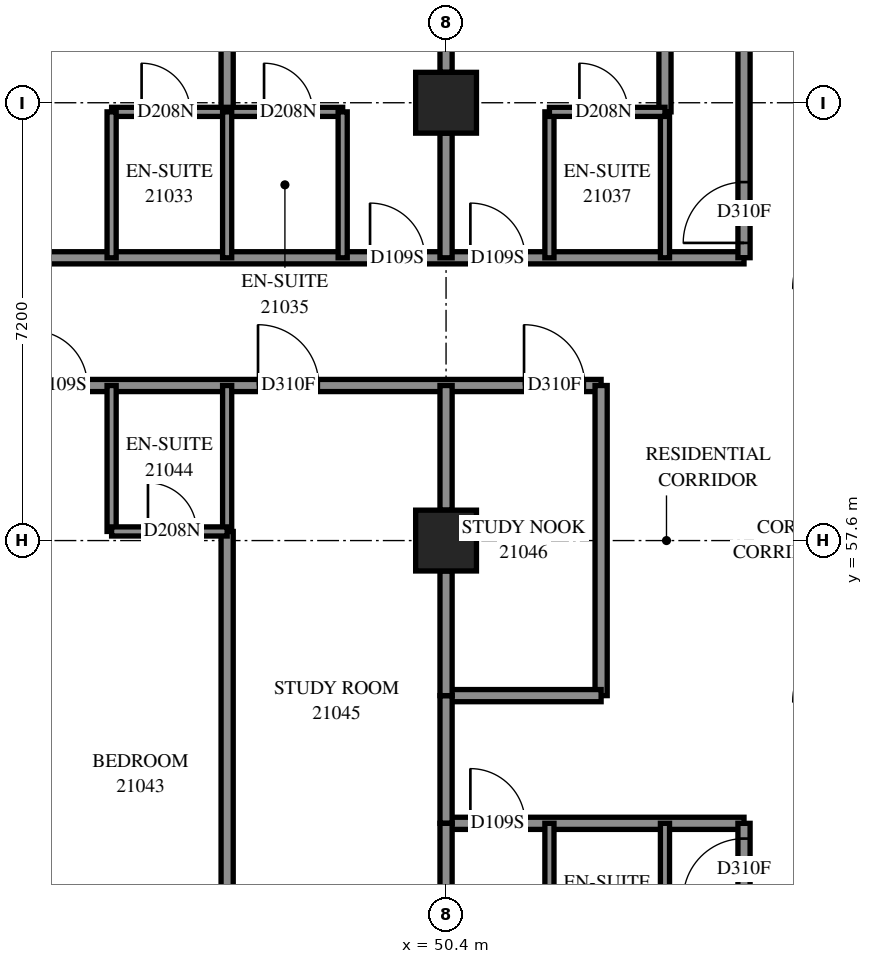
"""IFC4 building model, lengths in metres.
Left out: names, types, materials, properties, quantities, classifications, styles, units other than length and angle.
Written with IfcOpenShell. Run it as: python <this file> out.ifc"""

import sys

from ifc_helpers import new_model, si_unit, direction, frame, frame_2d, origin, origin_2d, place, context, subcontext, project, spatial, rectangle, extrude, element, fill, save


model = new_model("IFC4")
c1 = context("Model", 3, precision=1e-05, world=origin(), true_north=direction((0.0, 1.0)))
c2 = subcontext(c1, "Body", "Model", "MODEL_VIEW")
j1 = project(units=[si_unit("LENGTHUNIT", "METRE"), si_unit("PLANEANGLEUNIT", "RADIAN")], contexts=[c1])
p1 = place(None, origin())
s1 = spatial("IfcSite", under=j1, at=p1, CompositionType="ELEMENT")
p2 = place(p1, origin())
s2 = spatial("IfcBuilding", under=s1, at=p2, CompositionType="ELEMENT")
p3 = place(p2, frame((0.0, 0.0, 81.2)))
s3 = spatial("IfcBuildingStorey", under=s2, at=p3, CompositionType="ELEMENT", Elevation=81.2)
for number, where, z_axis, x_axis in (
    (1, (50.4, 57.6, 0.0), (0.0, 0.0, 1.0), (1.0, 0.0, 0.0)),
    (2, (50.4, 64.8, 0.0), (0.0, 0.0, 1.0), (1.0, 0.0, 0.0)),
):
    element("IfcColumn", number, at=place(p3, frame(where, z_axis=z_axis, x_axis=x_axis)), inside=s3, PredefinedType="COLUMN", context=c2, shape_type="SweptSolid", body=[
        extrude(rectangle(XDim=1.0, YDim=1.0, at=origin_2d()), origin(), (0.0, 0.0, 1.0), 3.1),
    ])
p4 = place(p3, frame((28.8, 60.15, 0.0), z_axis=(0.0, 0.0, 1.0), x_axis=(1.0, 0.0, 0.0)))
e3 = element("IfcWall", 3, at=p4, inside=s3, PredefinedType="PARTITIONING", context=c2, shape_type="SweptSolid", body=[
    extrude(rectangle(XDim=24.15, YDim=0.2, at=frame_2d((12.075, 0.0))), origin(), (0.0, 0.0, 1.0), 3.1),
])
p5 = place(p4, frame((11.325, 0.0, 0.0)))
e4 = element("IfcOpeningElement", 4, at=p5, cuts=e3, PredefinedType="OPENING", context=c2, shape_type="SweptSolid", body=[
    extrude(rectangle(XDim=1.0, YDim=2.1, at=frame_2d((0.5, 1.05))), frame((0.0, 0.11, 0.0), z_axis=(0.0, -1.0, 0.0), x_axis=(1.0, 0.0, 0.0)), (0.0, 0.0, 1.0), 0.22),
])
p6 = place(p4, frame((14.8, 0.0, 0.0)))
e5 = element("IfcOpeningElement", 5, at=p6, cuts=e3, PredefinedType="OPENING", context=c2, shape_type="SweptSolid", body=[
    extrude(rectangle(XDim=0.9, YDim=2.1, at=frame_2d((0.45, 1.05))), frame((0.0, 0.11, 0.0), z_axis=(0.0, -1.0, 0.0), x_axis=(1.0, 0.0, 0.0)), (0.0, 0.0, 1.0), 0.22),
])
p7 = place(p4, frame((18.508, 0.0, 0.0)))
e6 = element("IfcOpeningElement", 6, at=p7, cuts=e3, PredefinedType="OPENING", context=c2, shape_type="SweptSolid", body=[
    extrude(rectangle(XDim=1.0, YDim=2.1, at=frame_2d((0.5, 1.05))), frame((0.0, 0.11, 0.0), z_axis=(0.0, -1.0, 0.0), x_axis=(1.0, 0.0, 0.0)), (0.0, 0.0, 1.0), 0.22),
])
p8 = place(p4, frame((22.882, 0.0, 0.0)))
e7 = element("IfcOpeningElement", 7, at=p8, cuts=e3, PredefinedType="OPENING", context=c2, shape_type="SweptSolid", body=[
    extrude(rectangle(XDim=1.0, YDim=2.1, at=frame_2d((0.5, 1.05))), frame((0.0, 0.11, 0.0), z_axis=(0.0, -1.0, 0.0), x_axis=(1.0, 0.0, 0.0)), (0.0, 0.0, 1.0), 0.22),
])
p9 = place(p3, frame((33.45, 62.25, 0.0), z_axis=(0.0, 0.0, 1.0), x_axis=(1.0, 0.0, 0.0)))
e8 = element("IfcWall", 8, at=p9, inside=s3, PredefinedType="PARTITIONING", context=c2, shape_type="SweptSolid", body=[
    extrude(rectangle(XDim=21.85, YDim=0.2, at=frame_2d((10.925, 0.0))), origin(), (0.0, 0.0, 1.0), 3.1),
])
p10 = place(p9, frame((0.144, 0.0, 0.0)))
e9 = element("IfcOpeningElement", 9, at=p10, cuts=e8, PredefinedType="OPENING", context=c2, shape_type="SweptSolid", body=[
    extrude(rectangle(XDim=1.0, YDim=2.1, at=frame_2d((0.5, 1.05))), frame((0.0, 0.11, 0.0), z_axis=(0.0, -1.0, 0.0), x_axis=(1.0, 0.0, 0.0)), (0.0, 0.0, 1.0), 0.22),
])
p11 = place(p9, frame((2.95, 0.0, 0.0)))
e10 = element("IfcOpeningElement", 10, at=p11, cuts=e8, PredefinedType="OPENING", context=c2, shape_type="SweptSolid", body=[
    extrude(rectangle(XDim=0.9, YDim=2.1, at=frame_2d((0.45, 1.05))), frame((0.0, 0.11, 0.0), z_axis=(0.0, -1.0, 0.0), x_axis=(1.0, 0.0, 0.0)), (0.0, 0.0, 1.0), 0.22),
])
p12 = place(p9, frame((8.407, 0.0, 0.0)))
e11 = element("IfcOpeningElement", 11, at=p12, cuts=e8, PredefinedType="OPENING", context=c2, shape_type="SweptSolid", body=[
    extrude(rectangle(XDim=0.9, YDim=2.1, at=frame_2d((0.45, 1.05))), frame((0.0, 0.11, 0.0), z_axis=(0.0, -1.0, 0.0), x_axis=(1.0, 0.0, 0.0)), (0.0, 0.0, 1.0), 0.22),
])
p13 = place(p9, frame((15.7, 0.0, 0.0)))
e12 = element("IfcOpeningElement", 12, at=p13, cuts=e8, PredefinedType="OPENING", context=c2, shape_type="SweptSolid", body=[
    extrude(rectangle(XDim=0.9, YDim=2.1, at=frame_2d((0.45, 1.05))), frame((0.0, 0.11, 0.0), z_axis=(0.0, -1.0, 0.0), x_axis=(1.0, 0.0, 0.0)), (0.0, 0.0, 1.0), 0.22),
])
p14 = place(p9, frame((17.35, 0.0, 0.0)))
e13 = element("IfcOpeningElement", 13, at=p14, cuts=e8, PredefinedType="OPENING", context=c2, shape_type="SweptSolid", body=[
    extrude(rectangle(XDim=0.9, YDim=2.1, at=frame_2d((0.45, 1.05))), frame((0.0, 0.11, 0.0), z_axis=(0.0, -1.0, 0.0), x_axis=(1.0, 0.0, 0.0)), (0.0, 0.0, 1.0), 0.22),
])
p15 = place(p3, frame((46.8, 64.65, 0.0), z_axis=(0.0, 0.0, 1.0), x_axis=(0.0, 1.0, 0.0)))
e14 = element("IfcWall", 14, at=p15, inside=s3, PredefinedType="PARTITIONING", context=c2, shape_type="SweptSolid", body=[
    extrude(rectangle(XDim=8.062, YDim=0.2, at=frame_2d((4.031, 0.0))), origin(), (0.0, 0.0, 1.0), 3.1),
])
p16 = place(p3, frame((54.0, 64.65, 0.0), z_axis=(0.0, 0.0, 1.0), x_axis=(0.0, 1.0, 0.0)))
e15 = element("IfcWall", 15, at=p16, inside=s3, PredefinedType="PARTITIONING", context=c2, shape_type="SweptSolid", body=[
    extrude(rectangle(XDim=8.032, YDim=0.2, at=frame_2d((4.016, 0.0))), origin(), (0.0, 0.0, 1.0), 3.1),
])
p17 = place(p3, frame((46.8, 49.75, 0.0), z_axis=(0.0, 0.0, 1.0), x_axis=(0.0, 1.0, 0.0)))
e16 = element("IfcWall", 16, at=p17, inside=s3, PredefinedType="PARTITIONING", context=c2, shape_type="SweptSolid", body=[
    extrude(rectangle(XDim=8.0, YDim=0.2, at=frame_2d((4.0, 0.0))), origin(), (0.0, 0.0, 1.0), 3.1),
])
p18 = place(p3, frame((50.4, 65.3, 0.0), z_axis=(0.0, 0.0, 1.0), x_axis=(0.0, 1.0, 0.0)))
e17 = element("IfcWall", 17, at=p18, inside=s3, PredefinedType="PARTITIONING", context=c2, shape_type="SweptSolid", body=[
    extrude(rectangle(XDim=6.2, YDim=0.2, at=frame_2d((3.1, 0.0))), origin(), (0.0, 0.0, 1.0), 3.1),
])
p19 = place(p3, frame((52.95, 55.05, 0.0), z_axis=(0.0, 0.0, 1.0), x_axis=(0.0, 1.0, 0.0)))
e18 = element("IfcWall", 18, at=p19, inside=s3, PredefinedType="PARTITIONING", context=c2, shape_type="SweptSolid", body=[
    extrude(rectangle(XDim=5.1, YDim=0.2, at=frame_2d((2.55, 0.0))), origin(), (0.0, 0.0, 1.0), 3.1),
])
p20 = place(p3, frame((50.4, 52.95, 0.0), z_axis=(0.0, 0.0, 1.0), x_axis=(1.0, 0.0, 0.0)))
e19 = element("IfcWall", 19, at=p20, inside=s3, PredefinedType="PARTITIONING", context=c2, shape_type="SweptSolid", body=[
    extrude(rectangle(XDim=4.9, YDim=0.2, at=frame_2d((2.45, 0.0))), origin(), (0.0, 0.0, 1.0), 3.1),
])
p21 = place(p20, frame((0.4, 0.0, 0.0)))
e20 = element("IfcOpeningElement", 20, at=p21, cuts=e19, PredefinedType="OPENING", context=c2, shape_type="SweptSolid", body=[
    extrude(rectangle(XDim=0.9, YDim=2.1, at=frame_2d((0.45, 1.05))), frame((0.0, 0.11, 0.0), z_axis=(0.0, -1.0, 0.0), x_axis=(1.0, 0.0, 0.0)), (0.0, 0.0, 1.0), 0.22),
])
p22 = place(p3, frame((55.3, 48.1, 0.0), z_axis=(0.0, 0.0, 1.0), x_axis=(0.0, 1.0, 0.0)))
e21 = element("IfcWall", 21, at=p22, inside=s3, PredefinedType="PARTITIONING", context=c2, shape_type="SweptSolid", body=[
    extrude(rectangle(XDim=4.85, YDim=0.2, at=frame_2d((2.425, 0.0))), origin(), (0.0, 0.0, 1.0), 3.1),
])
p23 = place(p22, frame((3.599, 0.0, 0.0)))
e22 = element("IfcOpeningElement", 22, at=p23, cuts=e21, PredefinedType="OPENING", context=c2, shape_type="SweptSolid", body=[
    extrude(rectangle(XDim=1.0, YDim=2.1, at=frame_2d((0.5, 1.05))), frame((0.0, 0.11, 0.0), z_axis=(0.0, -1.0, 0.0), x_axis=(1.0, 0.0, 0.0)), (0.0, 0.0, 1.0), 0.22),
])
p24 = place(p3, frame((55.3, 62.252, 0.0), z_axis=(0.0, 0.0, 1.0), x_axis=(0.0, 1.0, 0.0)))
e23 = element("IfcWall", 23, at=p24, inside=s3, PredefinedType="PARTITIONING", context=c2, shape_type="SweptSolid", body=[
    extrude(rectangle(XDim=4.848, YDim=0.2, at=frame_2d((2.424, 0.0))), origin(), (0.0, 0.0, 1.0), 3.1),
])
p25 = place(p24, frame((0.243, 0.0, 0.0)))
e24 = element("IfcOpeningElement", 24, at=p25, cuts=e23, PredefinedType="OPENING", context=c2, shape_type="SweptSolid", body=[
    extrude(rectangle(XDim=1.0, YDim=2.1, at=frame_2d((0.5, 1.05))), frame((0.0, 0.11, 0.0), z_axis=(0.0, -1.0, 0.0), x_axis=(1.0, 0.0, 0.0)), (0.0, 0.0, 1.0), 0.22),
])
p26 = place(p3, frame((44.9, 64.65, 0.0), z_axis=(0.0, 0.0, 1.0), x_axis=(1.0, 0.0, 0.0)))
e25 = element("IfcWall", 25, at=p26, inside=s3, PredefinedType="PARTITIONING", context=c2, shape_type="SweptSolid", body=[
    extrude(rectangle(XDim=3.8, YDim=0.15, at=frame_2d((1.9, 0.0))), origin(), (0.0, 0.0, 1.0), 3.1),
])
p27 = place(p26, frame((0.493, 0.0, 0.0)))
e26 = element("IfcOpeningElement", 26, at=p27, cuts=e25, PredefinedType="OPENING", context=c2, shape_type="SweptSolid", body=[
    extrude(rectangle(XDim=0.8, YDim=2.1, at=frame_2d((0.4, 1.05))), frame((0.0, 0.085, 0.0), z_axis=(0.0, -1.0, 0.0), x_axis=(1.0, 0.0, 0.0)), (0.0, 0.0, 1.0), 0.17),
])
p28 = place(p26, frame((2.507, 0.0, 0.0)))
e27 = element("IfcOpeningElement", 27, at=p28, cuts=e25, PredefinedType="OPENING", context=c2, shape_type="SweptSolid", body=[
    extrude(rectangle(XDim=0.8, YDim=2.1, at=frame_2d((0.4, 1.05))), frame((0.0, 0.085, 0.0), z_axis=(0.0, -1.0, 0.0), x_axis=(1.0, 0.0, 0.0)), (0.0, 0.0, 1.0), 0.17),
])
p29 = place(p3, frame((50.4, 55.05, 0.0), z_axis=(0.0, 0.0, 1.0), x_axis=(1.0, 0.0, 0.0)))
e28 = element("IfcWall", 28, at=p29, inside=s3, PredefinedType="PARTITIONING", context=c2, shape_type="SweptSolid", body=[
    extrude(rectangle(XDim=2.55, YDim=0.2, at=frame_2d((1.275, 0.0))), origin(), (0.0, 0.0, 1.0), 3.1),
])
for number, where, z_axis, x_axis in (
    (29, (44.9, 62.25, 0.0), (0.0, 0.0, 1.0), (0.0, 1.0, 0.0)),
    (30, (46.8, 62.25, 0.0), (0.0, 0.0, 1.0), (0.0, 1.0, 0.0)),
    (31, (48.7, 62.25, 0.0), (0.0, 0.0, 1.0), (0.0, 1.0, 0.0)),
    (32, (52.1, 50.55, 0.0), (0.0, 0.0, 1.0), (0.0, 1.0, 0.0)),
    (33, (52.1, 62.25, 0.0), (0.0, 0.0, 1.0), (0.0, 1.0, 0.0)),
    (34, (54.0, 50.55, 0.0), (0.0, 0.0, 1.0), (0.0, 1.0, 0.0)),
    (35, (54.0, 62.25, 0.0), (0.0, 0.0, 1.0), (0.0, 1.0, 0.0)),
    (36, (44.9, 57.75, 0.0), (0.0, 0.0, 1.0), (0.0, 1.0, 0.0)),
    (37, (46.8, 57.75, 0.0), (0.0, 0.0, 1.0), (0.0, 1.0, 0.0)),
):
    element("IfcWall", number, at=place(p3, frame(where, z_axis=z_axis, x_axis=x_axis)), inside=s3, PredefinedType="PARTITIONING", context=c2, shape_type="SweptSolid", body=[
        extrude(rectangle(XDim=2.4, YDim=0.15, at=frame_2d((1.2, 0.0))), origin(), (0.0, 0.0, 1.0), 3.1),
    ])
p30 = place(p3, frame((50.4, 52.95, 0.0), z_axis=(0.0, 0.0, 1.0), x_axis=(0.0, 1.0, 0.0)))
e38 = element("IfcWall", 38, at=p30, inside=s3, PredefinedType="PARTITIONING", context=c2, shape_type="SweptSolid", body=[
    extrude(rectangle(XDim=2.1, YDim=0.2, at=frame_2d((1.05, 0.0))), origin(), (0.0, 0.0, 1.0), 3.1),
])
for number, where, z_axis, x_axis in (
    (39, (50.4, 50.9, 0.0), (0.0, 0.0, 1.0), (0.0, 1.0, 0.0)),
    (40, (50.4, 55.05, 0.0), (0.0, 0.0, 1.0), (0.0, 1.0, 0.0)),
    (41, (50.4, 58.1, 0.0), (0.0, 0.0, 1.0), (0.0, 1.0, 0.0)),
    (42, (50.4, 62.25, 0.0), (0.0, 0.0, 1.0), (0.0, 1.0, 0.0)),
):
    element("IfcWall", number, at=place(p3, frame(where, z_axis=z_axis, x_axis=x_axis)), inside=s3, PredefinedType="PARTITIONING", context=c2, shape_type="SweptSolid", body=[
        extrude(rectangle(XDim=2.05, YDim=0.2, at=frame_2d((1.025, 0.0))), origin(), (0.0, 0.0, 1.0), 3.1),
    ])
p31 = place(p3, frame((52.1, 64.65, 0.0), z_axis=(0.0, 0.0, 1.0), x_axis=(1.0, 0.0, 0.0)))
e43 = element("IfcWall", 43, at=p31, inside=s3, PredefinedType="PARTITIONING", context=c2, shape_type="SweptSolid", body=[
    extrude(rectangle(XDim=1.9, YDim=0.15, at=frame_2d((0.95, 0.0))), origin(), (0.0, 0.0, 1.0), 3.1),
])
p32 = place(p31, frame((0.493, 0.0, 0.0)))
e44 = element("IfcOpeningElement", 44, at=p32, cuts=e43, PredefinedType="OPENING", context=c2, shape_type="SweptSolid", body=[
    extrude(rectangle(XDim=0.8, YDim=2.1, at=frame_2d((0.4, 1.05))), frame((0.0, 0.085, 0.0), z_axis=(0.0, -1.0, 0.0), x_axis=(1.0, 0.0, 0.0)), (0.0, 0.0, 1.0), 0.17),
])
p33 = place(p3, frame((44.9, 57.75, 0.0), z_axis=(0.0, 0.0, 1.0), x_axis=(1.0, 0.0, 0.0)))
e45 = element("IfcWall", 45, at=p33, inside=s3, PredefinedType="PARTITIONING", context=c2, shape_type="SweptSolid", body=[
    extrude(rectangle(XDim=1.9, YDim=0.15, at=frame_2d((0.95, 0.0))), origin(), (0.0, 0.0, 1.0), 3.1),
])
p34 = place(p33, frame((0.598, 0.0, 0.0)))
e46 = element("IfcOpeningElement", 46, at=p34, cuts=e45, PredefinedType="OPENING", context=c2, shape_type="SweptSolid", body=[
    extrude(rectangle(XDim=0.8, YDim=2.1, at=frame_2d((0.4, 1.05))), frame((0.0, 0.085, 0.0), z_axis=(0.0, -1.0, 0.0), x_axis=(1.0, 0.0, 0.0)), (0.0, 0.0, 1.0), 0.17),
])
p35 = place(p27, origin())
e47 = element("IfcDoor", 47, at=p35, inside=s3, OperationType="SINGLE_SWING_RIGHT", PredefinedType="DOOR", context=c2, shape_type="SweptSolid", body=[
    extrude(rectangle(XDim=0.8, YDim=2.1, at=frame_2d((0.4, 1.05))), frame((0.0, 0.025, 0.0), z_axis=(0.0, -1.0, 0.0), x_axis=(1.0, 0.0, 0.0)), (0.0, 0.0, 1.0), 0.05),
])
fill(e26, e47)
p36 = place(p13, origin())
e48 = element("IfcDoor", 48, at=p36, inside=s3, OperationType="SINGLE_SWING_LEFT", PredefinedType="DOOR", context=c2, shape_type="SweptSolid", body=[
    extrude(rectangle(XDim=0.9, YDim=2.1, at=frame_2d((0.45, 1.05))), frame((0.0, 0.025, 0.0), z_axis=(0.0, -1.0, 0.0), x_axis=(1.0, 0.0, 0.0)), (0.0, 0.0, 1.0), 0.05),
])
fill(e12, e48)
p37 = place(p28, origin())
e49 = element("IfcDoor", 49, at=p37, inside=s3, OperationType="SINGLE_SWING_RIGHT", PredefinedType="DOOR", context=c2, shape_type="SweptSolid", body=[
    extrude(rectangle(XDim=0.8, YDim=2.1, at=frame_2d((0.4, 1.05))), frame((0.0, 0.025, 0.0), z_axis=(0.0, -1.0, 0.0), x_axis=(1.0, 0.0, 0.0)), (0.0, 0.0, 1.0), 0.05),
])
fill(e27, e49)
p38 = place(p14, origin())
e50 = element("IfcDoor", 50, at=p38, inside=s3, OperationType="SINGLE_SWING_RIGHT", PredefinedType="DOOR", context=c2, shape_type="SweptSolid", body=[
    extrude(rectangle(XDim=0.9, YDim=2.1, at=frame_2d((0.45, 1.05))), frame((0.0, 0.025, 0.0), z_axis=(0.0, -1.0, 0.0), x_axis=(1.0, 0.0, 0.0)), (0.0, 0.0, 1.0), 0.05),
])
fill(e13, e50)
p39 = place(p32, origin())
e51 = element("IfcDoor", 51, at=p39, inside=s3, OperationType="SINGLE_SWING_RIGHT", PredefinedType="DOOR", context=c2, shape_type="SweptSolid", body=[
    extrude(rectangle(XDim=0.8, YDim=2.1, at=frame_2d((0.4, 1.05))), frame((0.0, 0.025, 0.0), z_axis=(0.0, -1.0, 0.0), x_axis=(1.0, 0.0, 0.0)), (0.0, 0.0, 1.0), 0.05),
])
fill(e44, e51)
p40 = place(p25, origin())
e52 = element("IfcDoor", 52, at=p40, inside=s3, OperationType="SINGLE_SWING_LEFT", PredefinedType="DOOR", context=c2, shape_type="SweptSolid", body=[
    extrude(rectangle(XDim=1.0, YDim=2.1, at=frame_2d((0.5, 1.05))), frame((0.0, 0.025, 0.0), z_axis=(0.0, -1.0, 0.0), x_axis=(1.0, 0.0, 0.0)), (0.0, 0.0, 1.0), 0.05),
])
fill(e24, e52)
p41 = place(p6, origin())
e53 = element("IfcDoor", 53, at=p41, inside=s3, OperationType="SINGLE_SWING_LEFT", PredefinedType="DOOR", context=c2, shape_type="SweptSolid", body=[
    extrude(rectangle(XDim=0.9, YDim=2.1, at=frame_2d((0.45, 1.05))), frame((0.0, 0.025, 0.0), z_axis=(0.0, -1.0, 0.0), x_axis=(1.0, 0.0, 0.0)), (0.0, 0.0, 1.0), 0.05),
])
fill(e5, e53)
p42 = place(p34, origin())
e54 = element("IfcDoor", 54, at=p42, inside=s3, OperationType="SINGLE_SWING_RIGHT", PredefinedType="DOOR", context=c2, shape_type="SweptSolid", body=[
    extrude(rectangle(XDim=0.8, YDim=2.1, at=frame_2d((0.4, 1.05))), frame((0.0, 0.025, 0.0), z_axis=(0.0, -1.0, 0.0), x_axis=(1.0, 0.0, 0.0)), (0.0, 0.0, 1.0), 0.05),
])
fill(e46, e54)
p43 = place(p7, origin())
e55 = element("IfcDoor", 55, at=p43, inside=s3, OperationType="SINGLE_SWING_RIGHT", PredefinedType="DOOR", context=c2, shape_type="SweptSolid", body=[
    extrude(rectangle(XDim=1.0, YDim=2.1, at=frame_2d((0.5, 1.05))), frame((0.0, 0.025, 0.0), z_axis=(0.0, -1.0, 0.0), x_axis=(1.0, 0.0, 0.0)), (0.0, 0.0, 1.0), 0.05),
])
fill(e6, e55)
p44 = place(p8, origin())
e56 = element("IfcDoor", 56, at=p44, inside=s3, OperationType="SINGLE_SWING_LEFT", PredefinedType="DOOR", context=c2, shape_type="SweptSolid", body=[
    extrude(rectangle(XDim=1.0, YDim=2.1, at=frame_2d((0.5, 1.05))), frame((0.0, 0.025, 0.0), z_axis=(0.0, -1.0, 0.0), x_axis=(1.0, 0.0, 0.0)), (0.0, 0.0, 1.0), 0.05),
])
fill(e7, e56)
p45 = place(p21, origin())
e57 = element("IfcDoor", 57, at=p45, inside=s3, OperationType="SINGLE_SWING_LEFT", PredefinedType="DOOR", context=c2, shape_type="SweptSolid", body=[
    extrude(rectangle(XDim=0.9, YDim=2.1, at=frame_2d((0.45, 1.05))), frame((0.0, 0.025, 0.0), z_axis=(0.0, -1.0, 0.0), x_axis=(1.0, 0.0, 0.0)), (0.0, 0.0, 1.0), 0.05),
])
fill(e20, e57)
p46 = place(p23, origin())
e58 = element("IfcDoor", 58, at=p46, inside=s3, OperationType="SINGLE_SWING_RIGHT", PredefinedType="DOOR", context=c2, shape_type="SweptSolid", body=[
    extrude(rectangle(XDim=1.0, YDim=2.1, at=frame_2d((0.5, 1.05))), frame((0.0, 0.025, 0.0), z_axis=(0.0, -1.0, 0.0), x_axis=(1.0, 0.0, 0.0)), (0.0, 0.0, 1.0), 0.05),
])
fill(e22, e58)
save(model, sys.argv[1])
